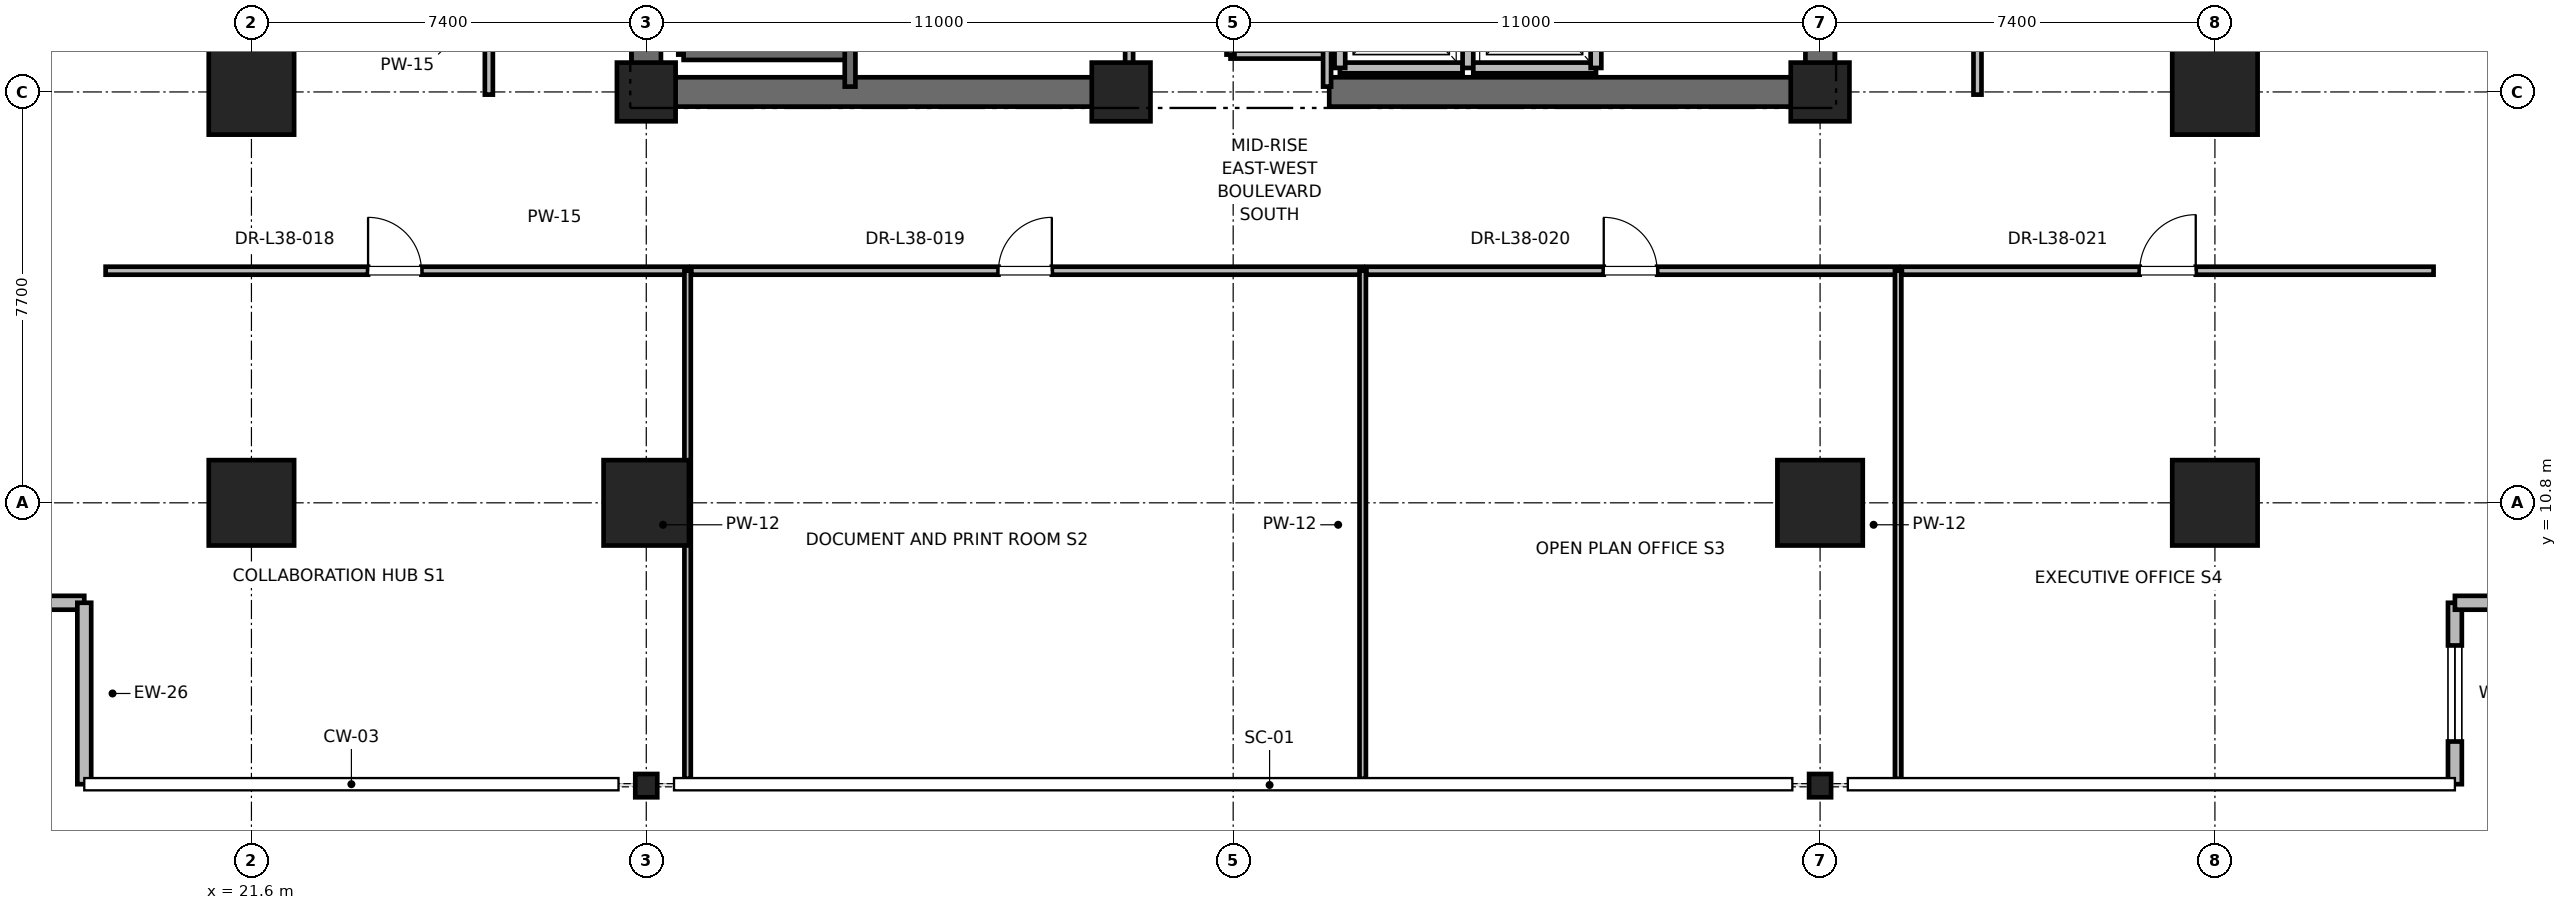
"""IFC4 building model, lengths in metres.
Left out: names, types, materials, properties, quantities, classifications, styles, units other than length and angle.
Written with IfcOpenShell. Run it as: python <this file> out.ifc"""

import sys

from ifc_helpers import new_model, si_unit, direction, frame, frame_2d, origin, origin_2d, place, context, subcontext, project, spatial, rectangle, i_section, extrude, element, fill, save


model = new_model("IFC4")
c1 = context("Model", 3, precision=1e-05, world=origin(), true_north=direction((0.0, 1.0)))
c2 = subcontext(c1, "Body", "Model", "MODEL_VIEW")
j1 = project(units=[si_unit("LENGTHUNIT", "METRE"), si_unit("PLANEANGLEUNIT", "RADIAN")], contexts=[c1])
p1 = place(None, origin())
s1 = spatial("IfcSite", under=j1, at=p1, CompositionType="ELEMENT")
p2 = place(p1, origin())
s2 = spatial("IfcBuilding", under=s1, at=p2, CompositionType="ELEMENT")
p3 = place(p2, frame((0.0, 0.0, 164.4)))
s3 = spatial("IfcBuildingStorey", under=s2, at=p3, CompositionType="ELEMENT", Elevation=164.4)
for number, where, z_axis, x_axis in (
    (1, (29.0, 10.8, 0.0), (0.0, 0.0, 1.0), (1.0, 0.0, 0.0)),
    (2, (51.0, 10.8, 0.0), (0.0, 0.0, 1.0), (1.0, 0.0, 0.0)),
    (3, (21.6, 18.5, 0.0), (0.0, 0.0, 1.0), (1.0, 0.0, 0.0)),
    (4, (58.4, 18.5, 0.0), (0.0, 0.0, 1.0), (1.0, 0.0, 0.0)),
    (5, (21.6, 10.8, 0.0), (0.0, 0.0, 1.0), (1.0, 0.0, 0.0)),
    (6, (58.4, 10.8, 0.0), (0.0, 0.0, 1.0), (1.0, 0.0, 0.0)),
):
    element("IfcColumn", number, at=place(p3, frame(where, z_axis=z_axis, x_axis=x_axis)), inside=s3, PredefinedType="COLUMN", context=c2, shape_type="SweptSolid", body=[
        extrude(rectangle(XDim=1.6, YDim=1.6, at=origin_2d()), origin(), (0.0, 0.0, 1.0), 4.0),
    ])
for number, where, z_axis, x_axis in (
    (7, (29.0, 5.5, 0.0), (0.0, 0.0, 1.0), (1.0, 0.0, 0.0)),
    (8, (51.0, 5.5, 0.0), (0.0, 0.0, 1.0), (1.0, 0.0, 0.0)),
):
    element("IfcColumn", number, at=place(p3, frame(where, z_axis=z_axis, x_axis=x_axis)), inside=s3, PredefinedType="COLUMN", context=c2, shape_type="SweptSolid", body=[
        extrude(i_section(OverallWidth=0.412, OverallDepth=0.437, WebThickness=0.036, FlangeThickness=0.058, FilletRadius=0.015, at=origin_2d()), origin(), (0.0, 0.0, 1.0), 4.0),
    ])
for number, where, z_axis, x_axis in (
    (9, (29.0, 18.5, 0.0), (0.0, 0.0, 1.0), (1.0, 0.0, 0.0)),
    (10, (51.0, 18.5, 0.0), (0.0, 0.0, 1.0), (1.0, 0.0, 0.0)),
    (11, (37.9, 18.5, 0.0), (0.0, 0.0, 1.0), (1.0, 0.0, 0.0)),
):
    element("IfcColumn", number, at=place(p3, frame(where, z_axis=z_axis, x_axis=x_axis)), inside=s3, PredefinedType="PILASTER", context=c2, shape_type="SweptSolid", body=[
        extrude(rectangle(XDim=1.1, YDim=1.1, at=origin_2d()), origin(), (0.0, 0.0, 1.0), 4.0),
    ])
for number, where, z_axis, x_axis in (
    (12, (29.0, 18.5, 0.0), (0.0, 0.0, 1.0), (1.0, 0.0, 0.0)),
    (13, (41.8, 18.5, 0.0), (0.0, 0.0, 1.0), (1.0, 0.0, 0.0)),
):
    element("IfcWall", number, at=place(p3, frame(where, z_axis=z_axis, x_axis=x_axis)), inside=s3, PredefinedType="SHEAR", context=c2, shape_type="SweptSolid", body=[
        extrude(rectangle(XDim=9.2, YDim=0.55, at=frame_2d((4.6, 0.0))), origin(), (0.0, 0.0, 1.0), 3.775),
    ])
p4 = place(p3, frame((29.0, 18.5, 0.0), z_axis=(0.0, 0.0, 1.0), x_axis=(0.0, 1.0, 0.0)))
e14 = element("IfcWall", 14, at=p4, inside=s3, PredefinedType="SHEAR", context=c2, shape_type="SweptSolid", body=[
    extrude(rectangle(XDim=8.8, YDim=0.55, at=frame_2d((4.4, 0.0))), origin(), (0.0, 0.0, 1.0), 3.775),
])
p5 = place(p3, frame((51.0, 18.5, 0.0), z_axis=(0.0, 0.0, 1.0), x_axis=(0.0, 1.0, 0.0)))
e15 = element("IfcWall", 15, at=p5, inside=s3, PredefinedType="SHEAR", context=c2, shape_type="SweptSolid", body=[
    extrude(rectangle(XDim=5.8, YDim=0.55, at=frame_2d((2.9, 0.0))), origin(), (0.0, 0.0, 1.0), 3.775),
])
p6 = place(p3, frame((14.667, 8.927, 0.0), z_axis=(0.0, 0.0, 1.0), x_axis=(1.0, 0.0, 0.0)))
e16 = element("IfcWall", 16, at=p6, inside=s3, PredefinedType="PARAPET", context=c2, shape_type="SweptSolid", body=[
    extrude(rectangle(XDim=3.8, YDim=0.26, at=frame_2d((1.9, 0.0))), origin(), (0.0, 0.0, 1.0), 3.775),
])
p7 = place(p6, frame((1.0, 0.0, 0.85)))
e17 = element("IfcOpeningElement", 17, at=p7, cuts=e16, PredefinedType="OPENING", context=c2, shape_type="SweptSolid", body=[
    extrude(rectangle(XDim=1.8, YDim=2.2, at=frame_2d((0.9, 1.1))), frame((0.0, 0.13, 0.0), z_axis=(0.0, -1.0, 0.0), x_axis=(1.0, 0.0, 0.0)), (0.0, 0.0, 1.0), 0.26),
])
p8 = place(p3, frame((18.467, 8.927, 0.0), z_axis=(0.0, 0.0, 1.0), x_axis=(0.0, -1.0, 0.0)))
e18 = element("IfcWall", 18, at=p8, inside=s3, PredefinedType="PARAPET", context=c2, shape_type="SweptSolid", body=[
    extrude(rectangle(XDim=3.4, YDim=0.26, at=frame_2d((1.7, 0.0))), origin(), (0.0, 0.0, 1.0), 3.775),
])
p9 = place(p3, frame((62.898, 5.527, 0.0), z_axis=(0.0, 0.0, 1.0), x_axis=(0.0, 1.0, 0.0)))
e19 = element("IfcWall", 19, at=p9, inside=s3, PredefinedType="PARAPET", context=c2, shape_type="SweptSolid", body=[
    extrude(rectangle(XDim=3.4, YDim=0.26, at=frame_2d((1.7, 0.0))), origin(), (0.0, 0.0, 1.0), 3.775),
])
p10 = place(p9, frame((0.8, 0.0, 0.85)))
e20 = element("IfcOpeningElement", 20, at=p10, cuts=e19, PredefinedType="OPENING", context=c2, shape_type="SweptSolid", body=[
    extrude(rectangle(XDim=1.8, YDim=2.2, at=frame_2d((0.9, 1.1))), frame((0.0, 0.13, 0.0), z_axis=(0.0, -1.0, 0.0), x_axis=(1.0, 0.0, 0.0)), (0.0, 0.0, 1.0), 0.26),
])
p11 = place(p3, frame((62.898, 8.927, 0.0), z_axis=(0.0, 0.0, 1.0), x_axis=(1.0, 0.0, 0.0)))
e21 = element("IfcWall", 21, at=p11, inside=s3, PredefinedType="PARAPET", context=c2, shape_type="SweptSolid", body=[
    extrude(rectangle(XDim=3.8, YDim=0.26, at=frame_2d((1.9, 0.0))), origin(), (0.0, 0.0, 1.0), 3.775),
])
p12 = place(p3, frame((29.7, 19.2, 0.0), z_axis=(0.0, 0.0, 1.0), x_axis=(0.0, 1.0, 0.0)))
e22 = element("IfcWall", 22, at=p12, inside=s3, PredefinedType="SOLIDWALL", context=c2, shape_type="SweptSolid", body=[
    extrude(rectangle(XDim=8.15, YDim=0.2, at=frame_2d((4.075, 0.0))), origin(), (0.0, 0.0, 1.0), 3.775),
])
p13 = place(p3, frame((29.7, 19.2, 0.0), z_axis=(0.0, 0.0, 1.0), x_axis=(1.0, 0.0, 0.0)))
e23 = element("IfcWall", 23, at=p13, inside=s3, PredefinedType="SOLIDWALL", context=c2, shape_type="SweptSolid", body=[
    extrude(rectangle(XDim=3.12, YDim=0.2, at=frame_2d((1.56, 0.0))), origin(), (0.0, 0.0, 1.0), 3.775),
])
p14 = place(p3, frame((32.82, 18.6, 0.0), z_axis=(0.0, 0.0, 1.0), x_axis=(0.0, 1.0, 0.0)))
e24 = element("IfcWall", 24, at=p14, inside=s3, PredefinedType="SOLIDWALL", context=c2, shape_type="SweptSolid", body=[
    extrude(rectangle(XDim=8.78, YDim=0.2, at=frame_2d((4.39, 0.0))), origin(), (0.0, 0.0, 1.0), 3.775),
])
p15 = place(p3, frame((42.0, 18.95, 0.0), z_axis=(0.0, 0.0, 1.0), x_axis=(1.0, 0.0, 0.0)))
e25 = element("IfcWall", 25, at=p15, inside=s3, PredefinedType="SOLIDWALL", context=c2, shape_type="SweptSolid", body=[
    extrude(rectangle(XDim=2.3, YDim=0.2, at=frame_2d((1.15, 0.0))), origin(), (0.0, 0.0, 1.0), 2.755),
])
p16 = place(p3, frame((42.0, 21.55, 0.0), z_axis=(0.0, 0.0, 1.0), x_axis=(0.0, -1.0, 0.0)))
e26 = element("IfcWall", 26, at=p16, inside=s3, PredefinedType="SOLIDWALL", context=c2, shape_type="SweptSolid", body=[
    extrude(rectangle(XDim=2.6, YDim=0.2, at=frame_2d((1.3, 0.0))), origin(), (0.0, 0.0, 1.0), 2.755),
])
p17 = place(p3, frame((44.4, 18.95, 0.0), z_axis=(0.0, 0.0, 1.0), x_axis=(0.0, 1.0, 0.0)))
e27 = element("IfcWall", 27, at=p17, inside=s3, PredefinedType="SOLIDWALL", context=c2, shape_type="SweptSolid", body=[
    extrude(rectangle(XDim=2.6, YDim=0.2, at=frame_2d((1.3, 0.0))), origin(), (0.0, 0.0, 1.0), 3.775),
])
p18 = place(p3, frame((44.5, 18.95, 0.0), z_axis=(0.0, 0.0, 1.0), x_axis=(1.0, 0.0, 0.0)))
e28 = element("IfcWall", 28, at=p18, inside=s3, PredefinedType="SOLIDWALL", context=c2, shape_type="SweptSolid", body=[
    extrude(rectangle(XDim=2.3, YDim=0.2, at=frame_2d((1.15, 0.0))), origin(), (0.0, 0.0, 1.0), 3.775),
])
p19 = place(p3, frame((46.8, 18.95, 0.0), z_axis=(0.0, 0.0, 1.0), x_axis=(0.0, 1.0, 0.0)))
e29 = element("IfcWall", 29, at=p19, inside=s3, PredefinedType="SOLIDWALL", context=c2, shape_type="SweptSolid", body=[
    extrude(rectangle(XDim=2.6, YDim=0.2, at=frame_2d((1.3, 0.0))), origin(), (0.0, 0.0, 1.0), 3.775),
])
p20 = place(p3, frame((39.95, 19.2, 0.0), z_axis=(0.0, 0.0, 1.0), x_axis=(1.0, 0.0, 0.0)))
e30 = element("IfcWall", 30, at=p20, inside=s3, PredefinedType="PARTITIONING", context=c2, shape_type="SweptSolid", body=[
    extrude(rectangle(XDim=1.81, YDim=0.15, at=frame_2d((0.905, 0.0))), origin(), (0.0, 0.0, 1.0), 2.85),
])
p21 = place(p3, frame((41.76, 18.6, 0.0), z_axis=(0.0, 0.0, 1.0), x_axis=(0.0, 1.0, 0.0)))
e31 = element("IfcWall", 31, at=p21, inside=s3, PredefinedType="PARTITIONING", context=c2, shape_type="SweptSolid", body=[
    extrude(rectangle(XDim=3.6, YDim=0.15, at=frame_2d((1.8, 0.0))), origin(), (0.0, 0.0, 1.0), 2.755),
])
p22 = place(p3, frame((39.95, 19.2, 0.0), z_axis=(0.0, 0.0, 1.0), x_axis=(0.0, 1.0, 0.0)))
e32 = element("IfcWall", 32, at=p22, inside=s3, PredefinedType="PARTITIONING", context=c2, shape_type="SweptSolid", body=[
    extrude(rectangle(XDim=3.0, YDim=0.15, at=frame_2d((1.5, 0.0))), origin(), (0.0, 0.0, 1.0), 2.85),
])
p23 = place(p22, frame((1.05, 0.0, 0.0)))
e33 = element("IfcOpeningElement", 33, at=p23, cuts=e32, PredefinedType="OPENING", context=c2, shape_type="SweptSolid", body=[
    extrude(rectangle(XDim=0.9, YDim=2.1, at=frame_2d((0.45, 1.05))), frame((0.0, 0.075, 0.0), z_axis=(0.0, -1.0, 0.0), x_axis=(1.0, 0.0, 0.0)), (0.0, 0.0, 1.0), 0.15),
])
p24 = place(p3, frame((38.05, 18.6, 0.0), z_axis=(0.0, 0.0, 1.0), x_axis=(0.0, 1.0, 0.0)))
e34 = element("IfcWall", 34, at=p24, inside=s3, PredefinedType="PARTITIONING", context=c2, shape_type="SweptSolid", body=[
    extrude(rectangle(XDim=8.78, YDim=0.15, at=frame_2d((4.39, 0.0))), origin(), (0.0, 0.0, 1.0), 2.755),
])
p25 = place(p24, frame((3.89, 0.0, 0.0)))
e35 = element("IfcOpeningElement", 35, at=p25, cuts=e34, PredefinedType="OPENING", context=c2, shape_type="SweptSolid", body=[
    extrude(rectangle(XDim=1.0, YDim=2.15, at=frame_2d((0.5, 1.075))), frame((0.0, 0.075, 0.0), z_axis=(0.0, -1.0, 0.0), x_axis=(1.0, 0.0, 0.0)), (0.0, 0.0, 1.0), 0.15),
])
p26 = place(p3, frame((18.867, 15.15, 0.0), z_axis=(0.0, 0.0, 1.0), x_axis=(1.0, 0.0, 0.0)))
e36 = element("IfcWall", 36, at=p26, inside=s3, PredefinedType="PARTITIONING", context=c2, shape_type="SweptSolid", body=[
    extrude(rectangle(XDim=10.908, YDim=0.15, at=frame_2d((5.454, 0.0))), origin(), (0.0, 0.0, 1.0), 2.85),
])
p27 = place(p26, frame((4.919, 0.0, 0.0)))
e37 = element("IfcOpeningElement", 37, at=p27, cuts=e36, PredefinedType="OPENING", context=c2, shape_type="SweptSolid", body=[
    extrude(rectangle(XDim=1.0, YDim=2.15, at=frame_2d((0.5, 1.075))), frame((0.0, 0.075, 0.0), z_axis=(0.0, -1.0, 0.0), x_axis=(1.0, 0.0, 0.0)), (0.0, 0.0, 1.0), 0.15),
])
p28 = place(p3, frame((29.775, 5.627, 0.0), z_axis=(0.0, 0.0, 1.0), x_axis=(0.0, 1.0, 0.0)))
e38 = element("IfcWall", 38, at=p28, inside=s3, PredefinedType="PARTITIONING", context=c2, shape_type="SweptSolid", body=[
    extrude(rectangle(XDim=9.523, YDim=0.12, at=frame_2d((4.761, 0.0))), origin(), (0.0, 0.0, 1.0), 2.405),
])
p29 = place(p3, frame((29.845, 15.15, 0.0), z_axis=(0.0, 0.0, 1.0), x_axis=(1.0, 0.0, 0.0)))
e39 = element("IfcWall", 39, at=p29, inside=s3, PredefinedType="PARTITIONING", context=c2, shape_type="SweptSolid", body=[
    extrude(rectangle(XDim=12.583, YDim=0.15, at=frame_2d((6.292, 0.0))), origin(), (0.0, 0.0, 1.0), 2.85),
])
p30 = place(p29, frame((5.757, 0.0, 0.0)))
e40 = element("IfcOpeningElement", 40, at=p30, cuts=e39, PredefinedType="OPENING", context=c2, shape_type="SweptSolid", body=[
    extrude(rectangle(XDim=1.0, YDim=2.15, at=frame_2d((0.5, 1.075))), frame((0.0, 0.075, 0.0), z_axis=(0.0, -1.0, 0.0), x_axis=(1.0, 0.0, 0.0)), (0.0, 0.0, 1.0), 0.15),
])
p31 = place(p3, frame((42.428, 5.627, 0.0), z_axis=(0.0, 0.0, 1.0), x_axis=(0.0, 1.0, 0.0)))
e41 = element("IfcWall", 41, at=p31, inside=s3, PredefinedType="PARTITIONING", context=c2, shape_type="SweptSolid", body=[
    extrude(rectangle(XDim=9.523, YDim=0.12, at=frame_2d((4.761, 0.0))), origin(), (0.0, 0.0, 1.0), 2.405),
])
p32 = place(p3, frame((42.498, 15.15, 0.0), z_axis=(0.0, 0.0, 1.0), x_axis=(1.0, 0.0, 0.0)))
e42 = element("IfcWall", 42, at=p32, inside=s3, PredefinedType="PARTITIONING", context=c2, shape_type="SweptSolid", body=[
    extrude(rectangle(XDim=9.965, YDim=0.15, at=frame_2d((4.982, 0.0))), origin(), (0.0, 0.0, 1.0), 2.85),
])
p33 = place(p32, frame((4.448, 0.0, 0.0)))
e43 = element("IfcOpeningElement", 43, at=p33, cuts=e42, PredefinedType="OPENING", context=c2, shape_type="SweptSolid", body=[
    extrude(rectangle(XDim=1.0, YDim=2.15, at=frame_2d((0.5, 1.075))), frame((0.0, 0.075, 0.0), z_axis=(0.0, -1.0, 0.0), x_axis=(1.0, 0.0, 0.0)), (0.0, 0.0, 1.0), 0.15),
])
p34 = place(p3, frame((52.463, 5.627, 0.0), z_axis=(0.0, 0.0, 1.0), x_axis=(0.0, 1.0, 0.0)))
e44 = element("IfcWall", 44, at=p34, inside=s3, PredefinedType="PARTITIONING", context=c2, shape_type="SweptSolid", body=[
    extrude(rectangle(XDim=9.523, YDim=0.12, at=frame_2d((4.761, 0.0))), origin(), (0.0, 0.0, 1.0), 2.85),
])
p35 = place(p3, frame((52.533, 15.15, 0.0), z_axis=(0.0, 0.0, 1.0), x_axis=(1.0, 0.0, 0.0)))
e45 = element("IfcWall", 45, at=p35, inside=s3, PredefinedType="PARTITIONING", context=c2, shape_type="SweptSolid", body=[
    extrude(rectangle(XDim=9.965, YDim=0.15, at=frame_2d((4.982, 0.0))), origin(), (0.0, 0.0, 1.0), 2.85),
])
p36 = place(p35, frame((4.458, 0.0, 0.0)))
e46 = element("IfcOpeningElement", 46, at=p36, cuts=e45, PredefinedType="OPENING", context=c2, shape_type="SweptSolid", body=[
    extrude(rectangle(XDim=1.05, YDim=2.2, at=frame_2d((0.525, 1.1))), frame((0.0, 0.075, 0.0), z_axis=(0.0, -1.0, 0.0), x_axis=(1.0, 0.0, 0.0)), (0.0, 0.0, 1.0), 0.15),
])
p37 = place(p3, frame((26.05, 18.45, 0.0), z_axis=(0.0, 0.0, 1.0), x_axis=(0.0, 1.0, 0.0)))
e47 = element("IfcWall", 47, at=p37, inside=s3, PredefinedType="PARTITIONING", context=c2, shape_type="SweptSolid", body=[
    extrude(rectangle(XDim=6.335, YDim=0.15, at=frame_2d((3.167, 0.0))), origin(), (0.0, 0.0, 1.0), 2.85),
])
p38 = place(p37, frame((2.458, 0.0, 0.0)))
e48 = element("IfcOpeningElement", 48, at=p38, cuts=e47, PredefinedType="OPENING", context=c2, shape_type="SweptSolid", body=[
    extrude(rectangle(XDim=1.5, YDim=2.25, at=frame_2d((0.75, 1.125))), frame((0.0, 0.075, 0.0), z_axis=(0.0, -1.0, 0.0), x_axis=(1.0, 0.0, 0.0)), (0.0, 0.0, 1.0), 0.15),
])
p39 = place(p3, frame((53.95, 18.45, 0.0), z_axis=(0.0, 0.0, 1.0), x_axis=(0.0, 1.0, 0.0)))
e49 = element("IfcWall", 49, at=p39, inside=s3, PredefinedType="PARTITIONING", context=c2, shape_type="SweptSolid", body=[
    extrude(rectangle(XDim=7.602, YDim=0.15, at=frame_2d((3.801, 0.0))), origin(), (0.0, 0.0, 1.0), 2.85),
])
p40 = place(p39, frame((3.341, 0.0, 0.0)))
e50 = element("IfcOpeningElement", 50, at=p40, cuts=e49, PredefinedType="OPENING", context=c2, shape_type="SweptSolid", body=[
    extrude(rectangle(XDim=1.0, YDim=2.15, at=frame_2d((0.5, 1.075))), frame((0.0, 0.075, 0.0), z_axis=(0.0, -1.0, 0.0), x_axis=(1.0, 0.0, 0.0)), (0.0, 0.0, 1.0), 0.15),
])
p41 = place(p10, origin())
e51 = element("IfcWindow", 51, at=p41, inside=s3, PartitioningType="SINGLE_PANEL", PredefinedType="WINDOW", context=c2, shape_type="SweptSolid", body=[
    extrude(rectangle(XDim=1.8, YDim=2.2, at=frame_2d((0.9, 1.1))), frame((0.0, 0.03, 0.0), z_axis=(0.0, -1.0, 0.0), x_axis=(1.0, 0.0, 0.0)), (0.0, 0.0, 1.0), 0.06),
])
fill(e20, e51)
p42 = place(p27, origin())
e52 = element("IfcDoor", 52, at=p42, inside=s3, OperationType="SINGLE_SWING_LEFT", PredefinedType="DOOR", context=c2, shape_type="SweptSolid", body=[
    extrude(rectangle(XDim=1.0, YDim=2.15, at=frame_2d((0.5, 1.075))), frame((0.0, 0.025, 0.0), z_axis=(0.0, -1.0, 0.0), x_axis=(1.0, 0.0, 0.0)), (0.0, 0.0, 1.0), 0.05),
])
fill(e37, e52)
p43 = place(p30, origin())
e53 = element("IfcDoor", 53, at=p43, inside=s3, OperationType="SINGLE_SWING_RIGHT", PredefinedType="DOOR", context=c2, shape_type="SweptSolid", body=[
    extrude(rectangle(XDim=1.0, YDim=2.15, at=frame_2d((0.5, 1.075))), frame((0.0, 0.025, 0.0), z_axis=(0.0, -1.0, 0.0), x_axis=(1.0, 0.0, 0.0)), (0.0, 0.0, 1.0), 0.05),
])
fill(e40, e53)
p44 = place(p33, origin())
e54 = element("IfcDoor", 54, at=p44, inside=s3, OperationType="SINGLE_SWING_LEFT", PredefinedType="DOOR", context=c2, shape_type="SweptSolid", body=[
    extrude(rectangle(XDim=1.0, YDim=2.15, at=frame_2d((0.5, 1.075))), frame((0.0, 0.025, 0.0), z_axis=(0.0, -1.0, 0.0), x_axis=(1.0, 0.0, 0.0)), (0.0, 0.0, 1.0), 0.05),
])
fill(e43, e54)
p45 = place(p36, origin())
e55 = element("IfcDoor", 55, at=p45, inside=s3, OperationType="SINGLE_SWING_RIGHT", PredefinedType="DOOR", context=c2, shape_type="SweptSolid", body=[
    extrude(rectangle(XDim=1.05, YDim=2.2, at=frame_2d((0.525, 1.1))), frame((0.0, 0.025, 0.0), z_axis=(0.0, -1.0, 0.0), x_axis=(1.0, 0.0, 0.0)), (0.0, 0.0, 1.0), 0.05),
])
fill(e46, e55)
save(model, sys.argv[1])
